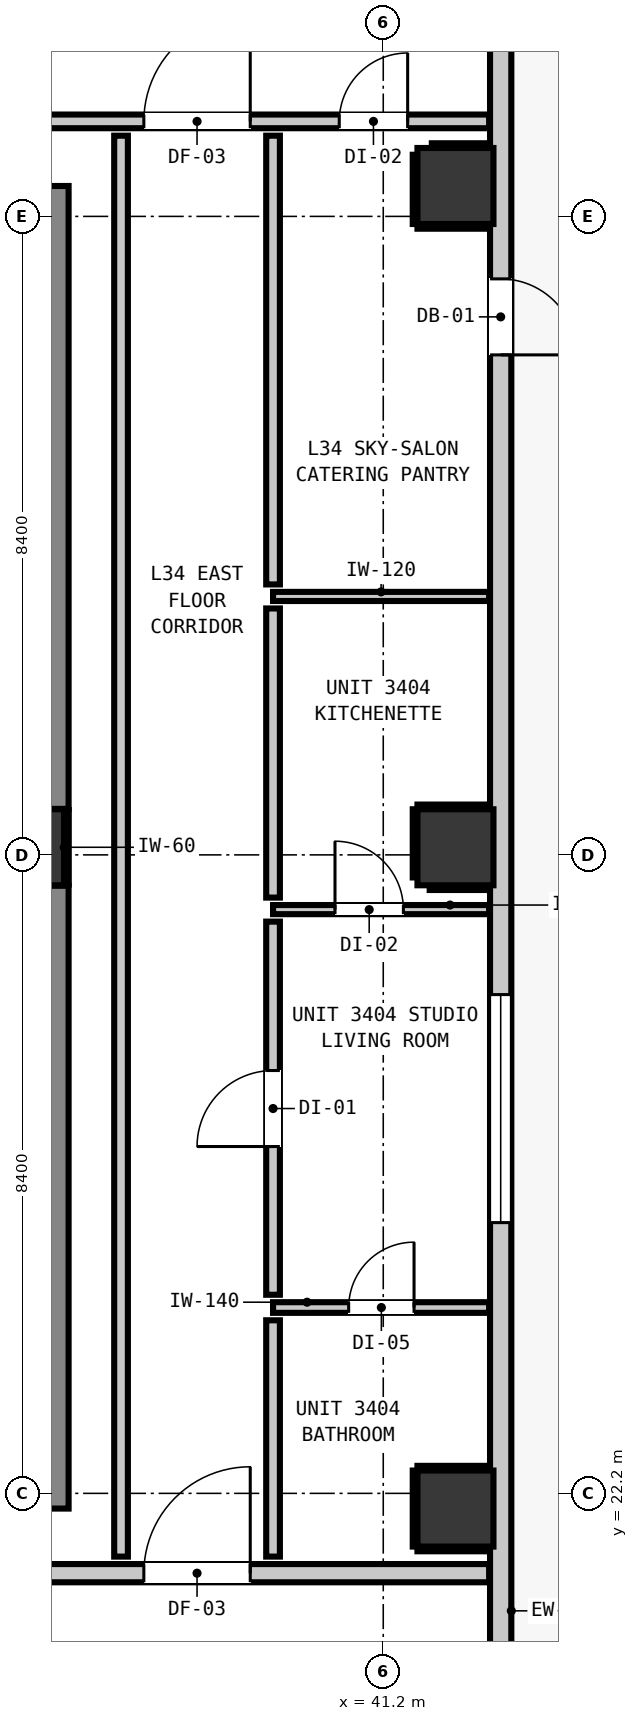
"""IFC4 building model, lengths in metres.
Left out: names, types, materials, properties, quantities, classifications, styles, units other than length and angle.
Written with IfcOpenShell. Run it as: python <this file> out.ifc"""

import sys

from ifc_helpers import new_model, si_unit, direction, frame, frame_2d, origin, origin_2d, place, context, subcontext, project, spatial, rectangle, extrude, element, fill, save


model = new_model("IFC4")
c1 = context("Model", 3, precision=1e-05, world=origin(), true_north=direction((0.0, 1.0)))
c2 = subcontext(c1, "Body", "Model", "MODEL_VIEW")
j1 = project(units=[si_unit("LENGTHUNIT", "METRE"), si_unit("PLANEANGLEUNIT", "RADIAN")], contexts=[c1])
p1 = place(None, origin())
s1 = spatial("IfcSite", under=j1, at=p1, CompositionType="ELEMENT")
p2 = place(p1, origin())
s2 = spatial("IfcBuilding", under=s1, at=p2, CompositionType="ELEMENT")
p3 = place(p2, frame((0.0, 0.0, 119.36)))
s3 = spatial("IfcBuildingStorey", under=s2, at=p3, CompositionType="ELEMENT", Elevation=119.36)
p4 = place(p3, frame((36.5, 30.7, 0.0), z_axis=(0.0, 0.0, 1.0), x_axis=(1.0, 0.0, 0.0)))
e1 = element("IfcColumn", 1, at=p4, inside=s3, PredefinedType="COLUMN", context=c2, shape_type="SweptSolid", body=[
    extrude(rectangle(XDim=1.0, YDim=1.0, at=origin_2d()), origin(), (0.0, 0.0, 1.0), 3.32),
])
p5 = place(p3, frame((36.56, 22.0, 0.0), z_axis=(0.0, 0.0, 1.0), x_axis=(0.0, 1.0, 0.0)))
e2 = element("IfcWall", 2, at=p5, inside=s3, PredefinedType="SHEAR", context=c2, shape_type="SweptSolid", body=[
    extrude(rectangle(XDim=8.195, YDim=1.0, at=frame_2d((4.098, 0.0))), origin(), (0.0, 0.0, 1.0), 3.32),
])
p6 = place(p3, frame((36.56, 31.205, 0.0), z_axis=(0.0, 0.0, 1.0), x_axis=(0.0, 1.0, 0.0)))
e3 = element("IfcWall", 3, at=p6, inside=s3, PredefinedType="SHEAR", context=c2, shape_type="SweptSolid", body=[
    extrude(rectangle(XDim=8.195, YDim=1.0, at=frame_2d((4.097, 0.0))), origin(), (0.0, 0.0, 1.0), 3.32),
])
for number, where, z_axis, x_axis in (
    (4, (42.15, 22.0, 0.0), (0.0, 0.0, 1.0), (1.0, 0.0, 0.0)),
    (5, (42.15, 30.7, 0.0), (0.0, 0.0, 1.0), (1.0, 0.0, 0.0)),
    (6, (42.15, 39.4, 0.0), (0.0, 0.0, 1.0), (1.0, 0.0, 0.0)),
):
    element("IfcColumn", number, at=place(p3, frame(where, z_axis=z_axis, x_axis=x_axis)), inside=s3, PredefinedType="COLUMN", context=c2, shape_type="SweptSolid", body=[
        extrude(rectangle(XDim=1.0, YDim=1.0, at=origin_2d()), origin(), (0.0, 0.0, 1.0), 3.32),
    ])
p7 = place(p3, frame((42.745, 43.645, 0.0), z_axis=(0.0, 0.0, 1.0), x_axis=(0.0, -1.0, 0.0)))
e7 = element("IfcWall", 7, at=p7, inside=s3, PredefinedType="STANDARD", context=c2, shape_type="SweptSolid", body=[
    extrude(rectangle(XDim=32.29, YDim=0.28, at=frame_2d((16.145, 0.0))), origin(), (0.0, 0.0, 1.0), 3.08),
])
p8 = place(p7, frame((5.467, 0.0, 0.0)))
e8 = element("IfcOpeningElement", 8, at=p8, cuts=e7, PredefinedType="OPENING", context=c2, shape_type="SweptSolid", body=[
    extrude(rectangle(XDim=1.0, YDim=2.15, at=frame_2d((0.5, 1.075))), frame((0.0, 0.15, 0.0), z_axis=(0.0, -1.0, 0.0), x_axis=(1.0, 0.0, 0.0)), (0.0, 0.0, 1.0), 0.3),
])
p9 = place(p7, frame((28.098, 0.0, 0.85)))
e9 = element("IfcOpeningElement", 9, at=p9, cuts=e7, PredefinedType="OPENING", context=c2, shape_type="SweptSolid", body=[
    extrude(rectangle(XDim=3.0, YDim=2.1, at=frame_2d((1.5, 1.05))), frame((0.0, 0.15, 0.0), z_axis=(0.0, -1.0, 0.0), x_axis=(1.0, 0.0, 0.0)), (0.0, 0.0, 1.0), 0.3),
])
p10 = place(p7, frame((0.318, 0.0, 0.85)))
e10 = element("IfcOpeningElement", 10, at=p10, cuts=e7, PredefinedType="OPENING", context=c2, shape_type="SweptSolid", body=[
    extrude(rectangle(XDim=1.05, YDim=1.65, at=frame_2d((0.525, 0.825))), frame((0.0, 0.15, 0.0), z_axis=(0.0, -1.0, 0.0), x_axis=(1.0, 0.0, 0.0)), (0.0, 0.0, 1.0), 0.3),
])
p11 = place(p7, frame((14.883, 0.0, 0.85)))
e11 = element("IfcOpeningElement", 11, at=p11, cuts=e7, PredefinedType="OPENING", context=c2, shape_type="SweptSolid", body=[
    extrude(rectangle(XDim=3.0, YDim=2.1, at=frame_2d((1.5, 1.05))), frame((0.0, 0.15, 0.0), z_axis=(0.0, -1.0, 0.0), x_axis=(1.0, 0.0, 0.0)), (0.0, 0.0, 1.0), 0.3),
])
p12 = place(p3, frame((3.207, 21.15, 0.0), z_axis=(0.0, 0.0, 1.0), x_axis=(1.0, 0.0, 0.0)))
e12 = element("IfcWall", 12, at=p12, inside=s3, PredefinedType="PARTITIONING", context=c2, shape_type="SweptSolid", body=[
    extrude(rectangle(XDim=39.386, YDim=0.24, at=frame_2d((19.693, 0.0))), origin(), (0.0, 0.0, 1.0), 3.08),
])
p13 = place(p12, frame((15.003, 0.0, 0.0)))
e13 = element("IfcOpeningElement", 13, at=p13, cuts=e12, PredefinedType="OPENING", context=c2, shape_type="SweptSolid", body=[
    extrude(rectangle(XDim=1.1, YDim=2.15, at=frame_2d((0.55, 1.075))), frame((0.0, 0.13, 0.0), z_axis=(0.0, -1.0, 0.0), x_axis=(1.0, 0.0, 0.0)), (0.0, 0.0, 1.0), 0.26),
])
p14 = place(p12, frame((7.243, 0.0, 0.0)))
e14 = element("IfcOpeningElement", 14, at=p14, cuts=e12, PredefinedType="OPENING", context=c2, shape_type="SweptSolid", body=[
    extrude(rectangle(XDim=1.4, YDim=2.15, at=frame_2d((0.7, 1.075))), frame((0.0, 0.13, 0.0), z_axis=(0.0, -1.0, 0.0), x_axis=(1.0, 0.0, 0.0)), (0.0, 0.0, 1.0), 0.26),
])
p15 = place(p12, frame((34.843, 0.0, 0.0)))
e15 = element("IfcOpeningElement", 15, at=p15, cuts=e12, PredefinedType="OPENING", context=c2, shape_type="SweptSolid", body=[
    extrude(rectangle(XDim=1.4, YDim=2.15, at=frame_2d((0.7, 1.075))), frame((0.0, 0.13, 0.0), z_axis=(0.0, -1.0, 0.0), x_axis=(1.0, 0.0, 0.0)), (0.0, 0.0, 1.0), 0.26),
])
p16 = place(p12, frame((3.042, 0.0, 0.0)))
e16 = element("IfcOpeningElement", 16, at=p16, cuts=e12, PredefinedType="OPENING", context=c2, shape_type="SweptSolid", body=[
    extrude(rectangle(XDim=0.9, YDim=2.1, at=frame_2d((0.45, 1.05))), frame((0.0, 0.13, 0.0), z_axis=(0.0, -1.0, 0.0), x_axis=(1.0, 0.0, 0.0)), (0.0, 0.0, 1.0), 0.26),
])
p17 = place(p3, frame((12.979, 40.25, 0.0), z_axis=(0.0, 0.0, 1.0), x_axis=(1.0, 0.0, 0.0)))
e17 = element("IfcWall", 17, at=p17, inside=s3, PredefinedType="PARTITIONING", context=c2, shape_type="SweptSolid", body=[
    extrude(rectangle(XDim=29.614, YDim=0.18, at=frame_2d((14.807, 0.0))), origin(), (0.0, 0.0, 1.0), 3.08),
])
p18 = place(p17, frame((4.456, 0.0, 0.0)))
e18 = element("IfcOpeningElement", 18, at=p18, cuts=e17, PredefinedType="OPENING", context=c2, shape_type="SweptSolid", body=[
    extrude(rectangle(XDim=1.4, YDim=2.15, at=frame_2d((0.7, 1.075))), frame((0.0, 0.1, 0.0), z_axis=(0.0, -1.0, 0.0), x_axis=(1.0, 0.0, 0.0)), (0.0, 0.0, 1.0), 0.2),
])
p19 = place(p17, frame((25.071, 0.0, 0.0)))
e19 = element("IfcOpeningElement", 19, at=p19, cuts=e17, PredefinedType="OPENING", context=c2, shape_type="SweptSolid", body=[
    extrude(rectangle(XDim=1.4, YDim=2.15, at=frame_2d((0.7, 1.075))), frame((0.0, 0.1, 0.0), z_axis=(0.0, -1.0, 0.0), x_axis=(1.0, 0.0, 0.0)), (0.0, 0.0, 1.0), 0.2),
])
p20 = place(p17, frame((27.642, 0.0, 0.0)))
e20 = element("IfcOpeningElement", 20, at=p20, cuts=e17, PredefinedType="OPENING", context=c2, shape_type="SweptSolid", body=[
    extrude(rectangle(XDim=0.9, YDim=2.1, at=frame_2d((0.45, 1.05))), frame((0.0, 0.1, 0.0), z_axis=(0.0, -1.0, 0.0), x_axis=(1.0, 0.0, 0.0)), (0.0, 0.0, 1.0), 0.2),
])
p21 = place(p3, frame((39.75, 24.645, 0.0), z_axis=(0.0, 0.0, 1.0), x_axis=(1.0, 0.0, 0.0)))
e21 = element("IfcWall", 21, at=p21, inside=s3, PredefinedType="PARTITIONING", context=c2, shape_type="SweptSolid", body=[
    extrude(rectangle(XDim=2.843, YDim=0.14, at=frame_2d((1.421, 0.0))), origin(), (0.0, 0.0, 1.0), 3.08),
])
p22 = place(p21, frame((0.995, 0.0, 0.0)))
e22 = element("IfcOpeningElement", 22, at=p22, cuts=e21, PredefinedType="OPENING", context=c2, shape_type="SweptSolid", body=[
    extrude(rectangle(XDim=0.86, YDim=2.02, at=frame_2d((0.43, 1.01))), frame((0.0, 0.08, 0.0), z_axis=(0.0, -1.0, 0.0), x_axis=(1.0, 0.0, 0.0)), (0.0, 0.0, 1.0), 0.16),
])
p23 = place(p3, frame((39.75, 29.88, 0.0), z_axis=(0.0, 0.0, 1.0), x_axis=(1.0, 0.0, 0.0)))
e23 = element("IfcWall", 23, at=p23, inside=s3, PredefinedType="PARTITIONING", context=c2, shape_type="SweptSolid", body=[
    extrude(rectangle(XDim=2.843, YDim=0.12, at=frame_2d((1.421, 0.0))), origin(), (0.0, 0.0, 1.0), 3.08),
])
p24 = place(p23, frame((0.815, 0.0, 0.0)))
e24 = element("IfcOpeningElement", 24, at=p24, cuts=e23, PredefinedType="OPENING", context=c2, shape_type="SweptSolid", body=[
    extrude(rectangle(XDim=0.9, YDim=2.1, at=frame_2d((0.45, 1.05))), frame((0.0, 0.07, 0.0), z_axis=(0.0, -1.0, 0.0), x_axis=(1.0, 0.0, 0.0)), (0.0, 0.0, 1.0), 0.14),
])
p25 = place(p3, frame((39.75, 34.0, 0.0), z_axis=(0.0, 0.0, 1.0), x_axis=(1.0, 0.0, 0.0)))
e25 = element("IfcWall", 25, at=p25, inside=s3, PredefinedType="PARTITIONING", context=c2, shape_type="SweptSolid", body=[
    extrude(rectangle(XDim=2.843, YDim=0.12, at=frame_2d((1.421, 0.0))), origin(), (0.0, 0.0, 1.0), 3.08),
])
p26 = place(p3, frame((37.75, 21.368, 0.0), z_axis=(0.0, 0.0, 1.0), x_axis=(0.0, 1.0, 0.0)))
e26 = element("IfcWall", 26, at=p26, inside=s3, PredefinedType="PARTITIONING", context=c2, shape_type="SweptSolid", body=[
    extrude(rectangle(XDim=18.694, YDim=0.18, at=frame_2d((9.347, 0.0))), origin(), (0.0, 0.0, 1.0), 3.08),
])
p27 = place(p3, frame((39.75, 21.368, 0.0), z_axis=(0.0, 0.0, 1.0), x_axis=(0.0, 1.0, 0.0)))
e27 = element("IfcWall", 27, at=p27, inside=s3, PredefinedType="PARTITIONING", context=c2, shape_type="SweptSolid", body=[
    extrude(rectangle(XDim=3.109, YDim=0.18, at=frame_2d((1.555, 0.0))), origin(), (0.0, 0.0, 1.0), 3.08),
])
p28 = place(p3, frame((39.75, 24.813, 0.0), z_axis=(0.0, 0.0, 1.0), x_axis=(0.0, 1.0, 0.0)))
e28 = element("IfcWall", 28, at=p28, inside=s3, PredefinedType="PARTITIONING", context=c2, shape_type="SweptSolid", body=[
    extrude(rectangle(XDim=4.909, YDim=0.18, at=frame_2d((2.455, 0.0))), origin(), (0.0, 0.0, 1.0), 3.08),
])
p29 = place(p28, frame((1.95, 0.0, 0.0)))
e29 = element("IfcOpeningElement", 29, at=p29, cuts=e28, PredefinedType="OPENING", context=c2, shape_type="SweptSolid", body=[
    extrude(rectangle(XDim=1.0, YDim=2.15, at=frame_2d((0.5, 1.075))), frame((0.0, 0.1, 0.0), z_axis=(0.0, -1.0, 0.0), x_axis=(1.0, 0.0, 0.0)), (0.0, 0.0, 1.0), 0.2),
])
p30 = place(p3, frame((39.75, 30.038, 0.0), z_axis=(0.0, 0.0, 1.0), x_axis=(0.0, 1.0, 0.0)))
e30 = element("IfcWall", 30, at=p30, inside=s3, PredefinedType="PARTITIONING", context=c2, shape_type="SweptSolid", body=[
    extrude(rectangle(XDim=3.804, YDim=0.18, at=frame_2d((1.902, 0.0))), origin(), (0.0, 0.0, 1.0), 3.08),
])
p31 = place(p3, frame((39.75, 34.158, 0.0), z_axis=(0.0, 0.0, 1.0), x_axis=(0.0, 1.0, 0.0)))
e31 = element("IfcWall", 31, at=p31, inside=s3, PredefinedType="PARTITIONING", context=c2, shape_type="SweptSolid", body=[
    extrude(rectangle(XDim=5.904, YDim=0.18, at=frame_2d((2.952, 0.0))), origin(), (0.0, 0.0, 1.0), 3.08),
])
p32 = place(p3, frame((37.032, 30.21, 0.0), z_axis=(0.0, 0.0, 1.0), x_axis=(0.0, 1.0, 0.0)))
e32 = element("IfcWall", 32, at=p32, inside=s3, PredefinedType="PARTITIONING", context=c2, shape_type="SweptSolid", body=[
    extrude(rectangle(XDim=0.98, YDim=0.06, at=frame_2d((0.49, 0.0))), origin(), (0.0, 0.0, 1.0), 1.45),
])
for number, where, z_axis, x_axis in (
    (33, (41.65, 21.468, 0.0), (0.0, 0.0, 1.0), (1.0, 0.0, 0.0)),
    (34, (41.65, 22.532, 0.0), (0.0, 0.0, 1.0), (1.0, 0.0, 0.0)),
):
    element("IfcWall", number, at=place(p3, frame(where, z_axis=z_axis, x_axis=x_axis)), inside=s3, PredefinedType="PARTITIONING", context=c2, shape_type="SweptSolid", body=[
        extrude(rectangle(XDim=0.94, YDim=0.06, at=frame_2d((0.47, 0.0))), origin(), (0.0, 0.0, 1.0), 1.45),
    ])
p33 = place(p3, frame((41.618, 21.5, 0.0), z_axis=(0.0, 0.0, 1.0), x_axis=(0.0, 1.0, 0.0)))
e35 = element("IfcWall", 35, at=p33, inside=s3, PredefinedType="PARTITIONING", context=c2, shape_type="SweptSolid", body=[
    extrude(rectangle(XDim=1.0, YDim=0.06, at=frame_2d((0.5, 0.0))), origin(), (0.0, 0.0, 1.0), 1.45),
])
p34 = place(p3, frame((41.811, 30.168, 0.0), z_axis=(0.0, 0.0, 1.0), x_axis=(1.0, 0.0, 0.0)))
e36 = element("IfcWall", 36, at=p34, inside=s3, PredefinedType="PARTITIONING", context=c2, shape_type="SweptSolid", body=[
    extrude(rectangle(XDim=0.779, YDim=0.06, at=frame_2d((0.39, 0.0))), origin(), (0.0, 0.0, 1.0), 1.45),
])
p35 = place(p3, frame((41.65, 31.232, 0.0), z_axis=(0.0, 0.0, 1.0), x_axis=(1.0, 0.0, 0.0)))
e37 = element("IfcWall", 37, at=p35, inside=s3, PredefinedType="PARTITIONING", context=c2, shape_type="SweptSolid", body=[
    extrude(rectangle(XDim=0.94, YDim=0.06, at=frame_2d((0.47, 0.0))), origin(), (0.0, 0.0, 1.0), 1.45),
])
p36 = place(p3, frame((41.618, 30.303, 0.0), z_axis=(0.0, 0.0, 1.0), x_axis=(0.0, 1.0, 0.0)))
e38 = element("IfcWall", 38, at=p36, inside=s3, PredefinedType="PARTITIONING", context=c2, shape_type="SweptSolid", body=[
    extrude(rectangle(XDim=0.897, YDim=0.06, at=frame_2d((0.448, 0.0))), origin(), (0.0, 0.0, 1.0), 1.45),
])
p37 = place(p3, frame((41.65, 38.868, 0.0), z_axis=(0.0, 0.0, 1.0), x_axis=(1.0, 0.0, 0.0)))
e39 = element("IfcWall", 39, at=p37, inside=s3, PredefinedType="PARTITIONING", context=c2, shape_type="SweptSolid", body=[
    extrude(rectangle(XDim=0.94, YDim=0.06, at=frame_2d((0.47, 0.0))), origin(), (0.0, 0.0, 1.0), 1.45),
])
p38 = place(p3, frame((41.839, 39.932, 0.0), z_axis=(0.0, 0.0, 1.0), x_axis=(1.0, 0.0, 0.0)))
e40 = element("IfcWall", 40, at=p38, inside=s3, PredefinedType="PARTITIONING", context=c2, shape_type="SweptSolid", body=[
    extrude(rectangle(XDim=0.751, YDim=0.06, at=frame_2d((0.375, 0.0))), origin(), (0.0, 0.0, 1.0), 1.45),
])
p39 = place(p3, frame((41.618, 38.9, 0.0), z_axis=(0.0, 0.0, 1.0), x_axis=(0.0, 1.0, 0.0)))
e41 = element("IfcWall", 41, at=p39, inside=s3, PredefinedType="PARTITIONING", context=c2, shape_type="SweptSolid", body=[
    extrude(rectangle(XDim=0.911, YDim=0.06, at=frame_2d((0.456, 0.0))), origin(), (0.0, 0.0, 1.0), 1.45),
])
p40 = place(p8, origin())
e42 = element("IfcDoor", 42, at=p40, inside=s3, OperationType="SINGLE_SWING_RIGHT", PredefinedType="DOOR", context=c2, shape_type="SweptSolid", body=[
    extrude(rectangle(XDim=1.0, YDim=2.15, at=frame_2d((0.5, 1.075))), frame((0.0, 0.025, 0.0), z_axis=(0.0, -1.0, 0.0), x_axis=(1.0, 0.0, 0.0)), (0.0, 0.0, 1.0), 0.05),
])
fill(e8, e42)
p41 = place(p11, origin())
e43 = element("IfcWindow", 43, at=p41, inside=s3, PartitioningType="SINGLE_PANEL", PredefinedType="WINDOW", context=c2, shape_type="SweptSolid", body=[
    extrude(rectangle(XDim=3.0, YDim=2.1, at=frame_2d((1.5, 1.05))), frame((0.0, 0.03, 0.0), z_axis=(0.0, -1.0, 0.0), x_axis=(1.0, 0.0, 0.0)), (0.0, 0.0, 1.0), 0.06),
])
fill(e11, e43)
p42 = place(p15, origin())
e44 = element("IfcDoor", 44, at=p42, inside=s3, OperationType="SINGLE_SWING_RIGHT", PredefinedType="DOOR", context=c2, shape_type="SweptSolid", body=[
    extrude(rectangle(XDim=1.4, YDim=2.15, at=frame_2d((0.7, 1.075))), frame((0.0, 0.025, 0.0), z_axis=(0.0, -1.0, 0.0), x_axis=(1.0, 0.0, 0.0)), (0.0, 0.0, 1.0), 0.05),
])
fill(e15, e44)
p43 = place(p19, origin())
e45 = element("IfcDoor", 45, at=p43, inside=s3, OperationType="SINGLE_SWING_RIGHT", PredefinedType="DOOR", context=c2, shape_type="SweptSolid", body=[
    extrude(rectangle(XDim=1.4, YDim=2.15, at=frame_2d((0.7, 1.075))), frame((0.0, 0.025, 0.0), z_axis=(0.0, -1.0, 0.0), x_axis=(1.0, 0.0, 0.0)), (0.0, 0.0, 1.0), 0.05),
])
fill(e19, e45)
p44 = place(p29, origin())
e46 = element("IfcDoor", 46, at=p44, inside=s3, OperationType="SINGLE_SWING_LEFT", PredefinedType="DOOR", context=c2, shape_type="SweptSolid", body=[
    extrude(rectangle(XDim=1.0, YDim=2.15, at=frame_2d((0.5, 1.075))), frame((0.0, 0.025, 0.0), z_axis=(0.0, -1.0, 0.0), x_axis=(1.0, 0.0, 0.0)), (0.0, 0.0, 1.0), 0.05),
])
fill(e29, e46)
p45 = place(p22, origin())
e47 = element("IfcDoor", 47, at=p45, inside=s3, OperationType="SINGLE_SWING_RIGHT", PredefinedType="DOOR", context=c2, shape_type="SweptSolid", body=[
    extrude(rectangle(XDim=0.86, YDim=2.02, at=frame_2d((0.43, 1.01))), frame((0.0, 0.025, 0.0), z_axis=(0.0, -1.0, 0.0), x_axis=(1.0, 0.0, 0.0)), (0.0, 0.0, 1.0), 0.05),
])
fill(e22, e47)
p46 = place(p24, origin())
e48 = element("IfcDoor", 48, at=p46, inside=s3, OperationType="SINGLE_SWING_LEFT", PredefinedType="DOOR", context=c2, shape_type="SweptSolid", body=[
    extrude(rectangle(XDim=0.9, YDim=2.1, at=frame_2d((0.45, 1.05))), frame((0.0, 0.025, 0.0), z_axis=(0.0, -1.0, 0.0), x_axis=(1.0, 0.0, 0.0)), (0.0, 0.0, 1.0), 0.05),
])
fill(e24, e48)
p47 = place(p20, origin())
e49 = element("IfcDoor", 49, at=p47, inside=s3, OperationType="SINGLE_SWING_RIGHT", PredefinedType="DOOR", context=c2, shape_type="SweptSolid", body=[
    extrude(rectangle(XDim=0.9, YDim=2.1, at=frame_2d((0.45, 1.05))), frame((0.0, 0.025, 0.0), z_axis=(0.0, -1.0, 0.0), x_axis=(1.0, 0.0, 0.0)), (0.0, 0.0, 1.0), 0.05),
])
fill(e20, e49)
save(model, sys.argv[1])
